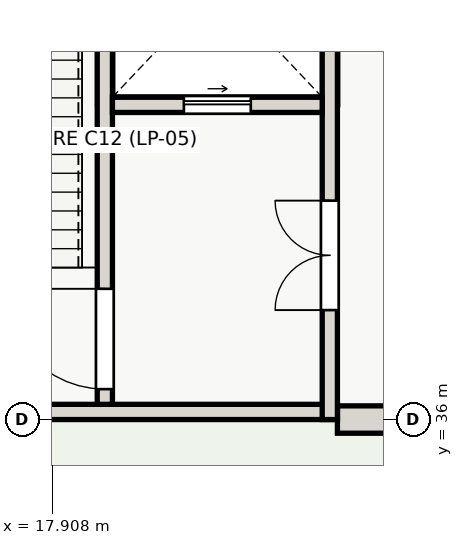
"""IFC4 building model, lengths in metres.
Left out: names, types, materials, properties, quantities, classifications, styles, units other than length and angle.
Written with IfcOpenShell. Run it as: python <this file> out.ifc"""

import sys

from ifc_helpers import new_model, si_unit, direction, frame, frame_2d, origin, place, context, subcontext, project, spatial, rectangle, extrude, element, fill, save


model = new_model("IFC4")
c1 = context("Model", 3, precision=1e-05, world=origin(), true_north=direction((0.0, 1.0)))
c2 = subcontext(c1, "Body", "Model", "MODEL_VIEW")
j1 = project(units=[si_unit("LENGTHUNIT", "METRE"), si_unit("PLANEANGLEUNIT", "RADIAN")], contexts=[c1])
p1 = place(None, origin())
s1 = spatial("IfcSite", under=j1, at=p1, CompositionType="ELEMENT")
p2 = place(p1, origin())
s2 = spatial("IfcBuilding", under=s1, at=p2, CompositionType="ELEMENT")
p3 = place(p2, origin())
s3 = spatial("IfcBuildingStorey", under=s2, at=p3, CompositionType="ELEMENT", Elevation=0.0)
p4 = place(p3, frame((24.0, 36.0, 0.0), z_axis=(0.0, 0.0, 1.0), x_axis=(-1.0, 0.0, 0.0)))
e1 = element("IfcWall", 1, at=p4, inside=s3, PredefinedType="SOLIDWALL", context=c2, shape_type="SweptSolid", body=[
    extrude(rectangle(XDim=1.4, YDim=0.45, at=frame_2d((0.7, 0.0))), origin(), (0.0, 0.0, 1.0), 3.55),
])
p5 = place(p3, frame((18.78, 41.18, -1.6), z_axis=(0.0, 0.0, 1.0), x_axis=(1.0, 0.0, 0.0)))
e2 = element("IfcWall", 2, at=p5, inside=s3, PredefinedType="SHEAR", context=c2, shape_type="SweptSolid", body=[
    extrude(rectangle(XDim=3.7, YDim=0.25, at=frame_2d((1.85, 0.0))), origin(), (0.0, 0.0, 1.0), 1.6),
])
for number, where, z_axis, x_axis in (
    (3, (22.48, 41.18, -1.6), (0.0, 0.0, 1.0), (0.0, 1.0, 0.0)),
    (4, (18.78, 45.08, -1.6), (0.0, 0.0, 1.0), (0.0, -1.0, 0.0)),
):
    element("IfcWall", number, at=place(p3, frame(where, z_axis=z_axis, x_axis=x_axis)), inside=s3, PredefinedType="SHEAR", context=c2, shape_type="SweptSolid", body=[
        extrude(rectangle(XDim=3.9, YDim=0.25, at=frame_2d((1.95, 0.0))), origin(), (0.0, 0.0, 1.0), 1.6),
    ])
p6 = place(p3, frame((22.6, 36.125, 0.0), z_axis=(0.0, 0.0, 1.0), x_axis=(-1.0, 0.0, 0.0)))
e5 = element("IfcWall", 5, at=p6, inside=s3, PredefinedType="SHEAR", context=c2, shape_type="SweptSolid", body=[
    extrude(rectangle(XDim=9.2, YDim=0.25, at=frame_2d((4.6, 0.0))), origin(), (0.0, 0.0, 1.0), 4.2),
])
p7 = place(p6, frame((5.9, 0.0, 0.0)))
e6 = element("IfcOpeningElement", 6, at=p7, cuts=e5, PredefinedType="OPENING", context=c2, shape_type="SweptSolid", body=[
    extrude(rectangle(XDim=1.9, YDim=2.2, at=frame_2d((0.95, 1.1))), frame((0.0, 0.135, 0.0), z_axis=(0.0, -1.0, 0.0), x_axis=(1.0, 0.0, 0.0)), (0.0, 0.0, 1.0), 0.27),
])
p8 = place(p3, frame((22.475, 36.0, 0.0), z_axis=(0.0, 0.0, 1.0), x_axis=(0.0, 1.0, 0.0)))
e7 = element("IfcWall", 7, at=p8, inside=s3, PredefinedType="SHEAR", context=c2, shape_type="SweptSolid", body=[
    extrude(rectangle(XDim=9.2, YDim=0.25, at=frame_2d((4.6, 0.0))), origin(), (0.0, 0.0, 1.0), 4.2),
])
p9 = place(p8, frame((1.8, 0.0, 0.0)))
e8 = element("IfcOpeningElement", 8, at=p9, cuts=e7, PredefinedType="OPENING", context=c2, shape_type="SweptSolid", body=[
    extrude(rectangle(XDim=1.8, YDim=2.15, at=frame_2d((0.9, 1.075))), frame((0.0, 0.135, 0.0), z_axis=(0.0, -1.0, 0.0), x_axis=(1.0, 0.0, 0.0)), (0.0, 0.0, 1.0), 0.27),
])
p10 = place(p3, frame((18.775, 36.25, 0.0), z_axis=(0.0, 0.0, 1.0), x_axis=(0.0, 1.0, 0.0)))
e9 = element("IfcWall", 9, at=p10, inside=s3, PredefinedType="SHEAR", context=c2, shape_type="SweptSolid", body=[
    extrude(rectangle(XDim=8.7, YDim=0.25, at=frame_2d((4.35, 0.0))), origin(), (0.0, 0.0, 1.0), 4.2),
])
p11 = place(p10, frame((0.25, 0.0, 0.0)))
e10 = element("IfcOpeningElement", 10, at=p11, cuts=e9, PredefinedType="OPENING", context=c2, shape_type="SweptSolid", body=[
    extrude(rectangle(XDim=1.65, YDim=2.1, at=frame_2d((0.825, 1.05))), frame((0.0, 0.135, 0.0), z_axis=(0.0, -1.0, 0.0), x_axis=(1.0, 0.0, 0.0)), (0.0, 0.0, 1.0), 0.27),
])
p12 = place(p3, frame((18.9, 41.175, 0.0), z_axis=(0.0, 0.0, 1.0), x_axis=(1.0, 0.0, 0.0)))
e11 = element("IfcWall", 11, at=p12, inside=s3, PredefinedType="SHEAR", context=c2, shape_type="SweptSolid", body=[
    extrude(rectangle(XDim=3.45, YDim=0.25, at=frame_2d((1.725, 0.0))), origin(), (0.0, 0.0, 1.0), 4.2),
])
p13 = place(p12, frame((1.175, 0.0, 0.0)))
e12 = element("IfcOpeningElement", 12, at=p13, cuts=e11, PredefinedType="OPENING", context=c2, shape_type="SweptSolid", body=[
    extrude(rectangle(XDim=1.1, YDim=2.1, at=frame_2d((0.55, 1.05))), frame((0.0, 0.135, 0.0), z_axis=(0.0, -1.0, 0.0), x_axis=(1.0, 0.0, 0.0)), (0.0, 0.0, 1.0), 0.27),
])
p14 = place(p9, origin())
e13 = element("IfcDoor", 13, at=p14, inside=s3, OperationType="DOUBLE_DOOR_SINGLE_SWING", PredefinedType="DOOR", context=c2, shape_type="SweptSolid", body=[
    extrude(rectangle(XDim=1.8, YDim=2.15, at=frame_2d((0.9, 1.075))), frame((0.0, 0.025, 0.0), z_axis=(0.0, -1.0, 0.0), x_axis=(1.0, 0.0, 0.0)), (0.0, 0.0, 1.0), 0.05),
])
fill(e8, e13)
p15 = place(p11, origin())
e14 = element("IfcDoor", 14, at=p15, inside=s3, OperationType="SINGLE_SWING_RIGHT", PredefinedType="DOOR", context=c2, shape_type="SweptSolid", body=[
    extrude(rectangle(XDim=1.65, YDim=2.1, at=frame_2d((0.825, 1.05))), frame((0.0, 0.025, 0.0), z_axis=(0.0, -1.0, 0.0), x_axis=(1.0, 0.0, 0.0)), (0.0, 0.0, 1.0), 0.05),
])
fill(e10, e14)
p16 = place(p13, origin())
e15 = element("IfcDoor", 15, at=p16, inside=s3, OperationType="SLIDING_TO_RIGHT", PredefinedType="DOOR", context=c2, shape_type="SweptSolid", body=[
    extrude(rectangle(XDim=1.1, YDim=2.1, at=frame_2d((0.55, 1.05))), frame((0.0, 0.025, 0.0), z_axis=(0.0, -1.0, 0.0), x_axis=(1.0, 0.0, 0.0)), (0.0, 0.0, 1.0), 0.05),
])
fill(e12, e15)
save(model, sys.argv[1])
